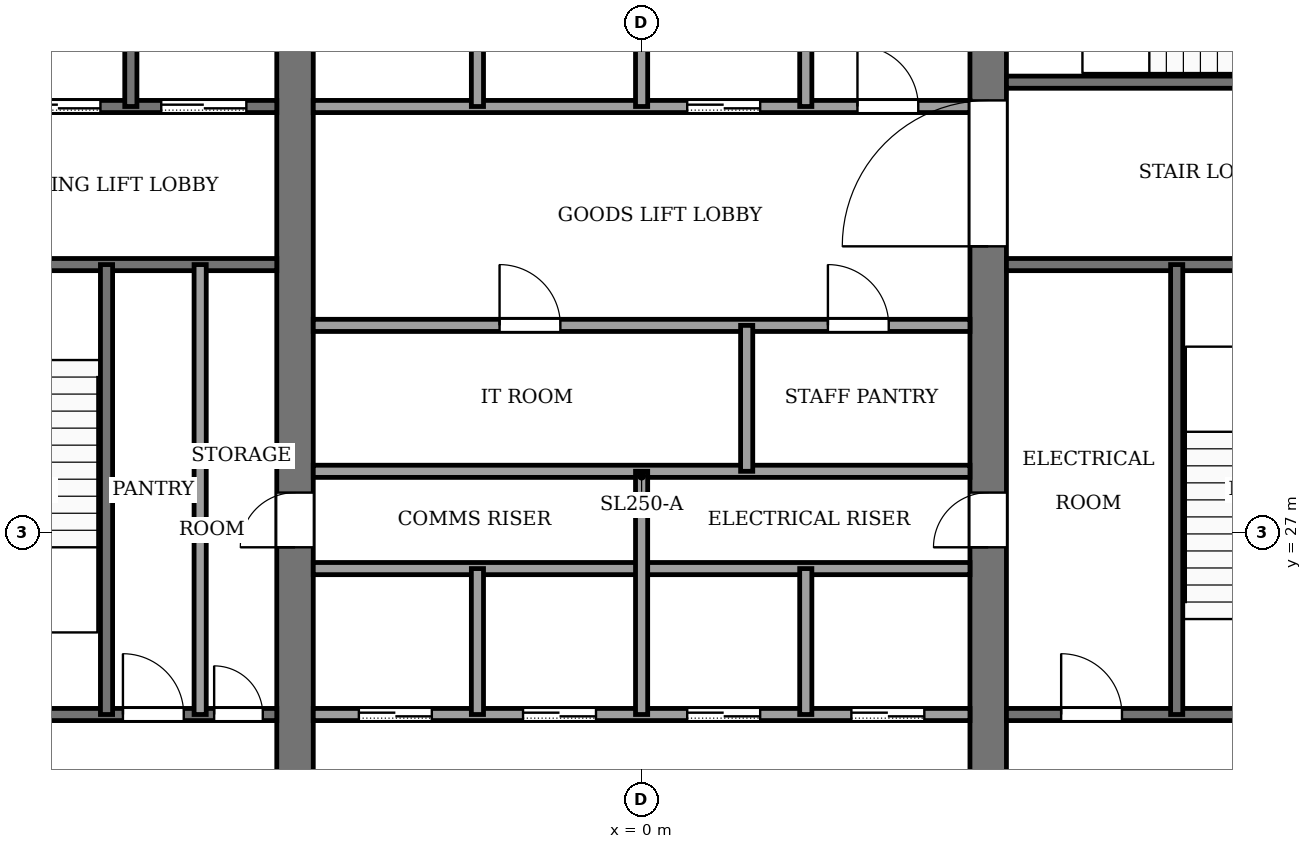
"""IFC4 building model, lengths in metres.
Left out: names, types, materials, properties, quantities, classifications, styles, units other than length and angle.
Written with IfcOpenShell. Run it as: python <this file> out.ifc"""

import sys

from ifc_helpers import new_model, si_unit, direction, frame, frame_2d, origin, place, context, subcontext, project, spatial, rectangle, extrude, element, fill, save


model = new_model("IFC4")
c1 = context("Model", 3, precision=1e-05, world=origin(), true_north=direction((0.0, 1.0)))
c2 = subcontext(c1, "Body", "Model", "MODEL_VIEW")
j1 = project(units=[si_unit("LENGTHUNIT", "METRE"), si_unit("PLANEANGLEUNIT", "RADIAN")], contexts=[c1])
p1 = place(None, origin())
s1 = spatial("IfcSite", under=j1, at=p1, CompositionType="ELEMENT")
p2 = place(p1, origin())
s2 = spatial("IfcBuilding", under=s1, at=p2, CompositionType="ELEMENT")
p3 = place(p2, frame((0.0, 0.0, 190.0)))
s3 = spatial("IfcBuildingStorey", under=s2, at=p3, CompositionType="ELEMENT", Elevation=190.0)
p4 = place(p3, frame((-5.7, 18.4, -0.13), z_axis=(0.0, 0.0, 1.0), x_axis=(0.0, 1.0, 0.0)))
e1 = element("IfcWall", 1, at=p4, inside=s3, PredefinedType="SHEAR", context=c2, shape_type="SweptSolid", body=[
    extrude(rectangle(XDim=19.2, YDim=0.6, at=frame_2d((9.6, 0.0))), origin(), (0.0, 0.0, 1.0), 4.0),
])
p5 = place(p4, frame((8.35, 0.0, 0.13)))
e2 = element("IfcOpeningElement", 2, at=p5, cuts=e1, PredefinedType="OPENING", context=c2, shape_type="SweptSolid", body=[
    extrude(rectangle(XDim=0.9, YDim=2.1, at=frame_2d((0.45, 1.05))), frame((0.0, 0.31, 0.0), z_axis=(0.0, -1.0, 0.0), x_axis=(1.0, 0.0, 0.0)), (0.0, 0.0, 1.0), 0.62),
])
p6 = place(p3, frame((5.7, 18.4, -0.13), z_axis=(0.0, 0.0, 1.0), x_axis=(0.0, 1.0, 0.0)))
e3 = element("IfcWall", 3, at=p6, inside=s3, PredefinedType="SHEAR", context=c2, shape_type="SweptSolid", body=[
    extrude(rectangle(XDim=19.2, YDim=0.6, at=frame_2d((9.6, 0.0))), origin(), (0.0, 0.0, 1.0), 4.0),
])
p7 = place(p6, frame((8.35, 0.0, 0.13)))
e4 = element("IfcOpeningElement", 4, at=p7, cuts=e3, PredefinedType="OPENING", context=c2, shape_type="SweptSolid", body=[
    extrude(rectangle(XDim=0.9, YDim=2.1, at=frame_2d((0.45, 1.05))), frame((0.0, 0.31, 0.0), z_axis=(0.0, -1.0, 0.0), x_axis=(1.0, 0.0, 0.0)), (0.0, 0.0, 1.0), 0.62),
])
p8 = place(p6, frame((13.3, 0.0, 0.13)))
e5 = element("IfcOpeningElement", 5, at=p8, cuts=e3, PredefinedType="OPENING", context=c2, shape_type="SweptSolid", body=[
    extrude(rectangle(XDim=2.4, YDim=2.4, at=frame_2d((1.2, 1.2))), frame((0.0, 0.31, 0.0), z_axis=(0.0, -1.0, 0.0), x_axis=(1.0, 0.0, 0.0)), (0.0, 0.0, 1.0), 0.62),
])
p9 = place(p3, frame((-12.6, 24.0, 0.0), z_axis=(0.0, 0.0, 1.0), x_axis=(1.0, 0.0, 0.0)))
e6 = element("IfcWall", 6, at=p9, inside=s3, PredefinedType="PARTITIONING", context=c2, shape_type="SweptSolid", body=[
    extrude(rectangle(XDim=6.6, YDim=0.2, at=frame_2d((3.3, 0.0))), origin(), (0.0, 0.0, 1.0), 3.87),
])
p10 = place(p9, frame((4.07, 0.0, 0.0)))
e7 = element("IfcOpeningElement", 7, at=p10, cuts=e6, PredefinedType="OPENING", context=c2, shape_type="SweptSolid", body=[
    extrude(rectangle(XDim=1.0, YDim=2.1, at=frame_2d((0.5, 1.05))), frame((0.0, 0.11, 0.0), z_axis=(0.0, -1.0, 0.0), x_axis=(1.0, 0.0, 0.0)), (0.0, 0.0, 1.0), 0.22),
])
p11 = place(p9, frame((5.57, 0.0, 0.0)))
e8 = element("IfcOpeningElement", 8, at=p11, cuts=e6, PredefinedType="OPENING", context=c2, shape_type="SweptSolid", body=[
    extrude(rectangle(XDim=0.8, YDim=2.1, at=frame_2d((0.4, 1.05))), frame((0.0, 0.11, 0.0), z_axis=(0.0, -1.0, 0.0), x_axis=(1.0, 0.0, 0.0)), (0.0, 0.0, 1.0), 0.22),
])
p12 = place(p3, frame((-5.4, 24.0, 0.0), z_axis=(0.0, 0.0, 1.0), x_axis=(1.0, 0.0, 0.0)))
e9 = element("IfcWall", 9, at=p12, inside=s3, PredefinedType="PARTITIONING", context=c2, shape_type="SweptSolid", body=[
    extrude(rectangle(XDim=10.8, YDim=0.2, at=frame_2d((5.4, 0.0))), origin(), (0.0, 0.0, 1.0), 3.87),
])
p13 = place(p12, frame((0.75, 0.0, 0.0)))
e10 = element("IfcOpeningElement", 10, at=p13, cuts=e9, PredefinedType="OPENING", context=c2, shape_type="SweptSolid", body=[
    extrude(rectangle(XDim=1.2, YDim=2.2, at=frame_2d((0.6, 1.1))), frame((0.0, 0.11, 0.0), z_axis=(0.0, -1.0, 0.0), x_axis=(1.0, 0.0, 0.0)), (0.0, 0.0, 1.0), 0.22),
])
p14 = place(p12, frame((3.45, 0.0, 0.0)))
e11 = element("IfcOpeningElement", 11, at=p14, cuts=e9, PredefinedType="OPENING", context=c2, shape_type="SweptSolid", body=[
    extrude(rectangle(XDim=1.2, YDim=2.2, at=frame_2d((0.6, 1.1))), frame((0.0, 0.11, 0.0), z_axis=(0.0, -1.0, 0.0), x_axis=(1.0, 0.0, 0.0)), (0.0, 0.0, 1.0), 0.22),
])
p15 = place(p12, frame((6.15, 0.0, 0.0)))
e12 = element("IfcOpeningElement", 12, at=p15, cuts=e9, PredefinedType="OPENING", context=c2, shape_type="SweptSolid", body=[
    extrude(rectangle(XDim=1.2, YDim=2.2, at=frame_2d((0.6, 1.1))), frame((0.0, 0.11, 0.0), z_axis=(0.0, -1.0, 0.0), x_axis=(1.0, 0.0, 0.0)), (0.0, 0.0, 1.0), 0.22),
])
p16 = place(p12, frame((8.85, 0.0, 0.0)))
e13 = element("IfcOpeningElement", 13, at=p16, cuts=e9, PredefinedType="OPENING", context=c2, shape_type="SweptSolid", body=[
    extrude(rectangle(XDim=1.2, YDim=2.2, at=frame_2d((0.6, 1.1))), frame((0.0, 0.11, 0.0), z_axis=(0.0, -1.0, 0.0), x_axis=(1.0, 0.0, 0.0)), (0.0, 0.0, 1.0), 0.22),
])
p17 = place(p3, frame((6.0, 24.0, 0.0), z_axis=(0.0, 0.0, 1.0), x_axis=(1.0, 0.0, 0.0)))
e14 = element("IfcWall", 14, at=p17, inside=s3, PredefinedType="PARTITIONING", context=c2, shape_type="SweptSolid", body=[
    extrude(rectangle(XDim=6.6, YDim=0.2, at=frame_2d((3.3, 0.0))), origin(), (0.0, 0.0, 1.0), 3.87),
])
p18 = place(p17, frame((0.9, 0.0, 0.0)))
e15 = element("IfcOpeningElement", 15, at=p18, cuts=e14, PredefinedType="OPENING", context=c2, shape_type="SweptSolid", body=[
    extrude(rectangle(XDim=1.0, YDim=2.1, at=frame_2d((0.5, 1.05))), frame((0.0, 0.11, 0.0), z_axis=(0.0, -1.0, 0.0), x_axis=(1.0, 0.0, 0.0)), (0.0, 0.0, 1.0), 0.22),
])
p19 = place(p17, frame((4.4, 0.0, 0.0)))
e16 = element("IfcOpeningElement", 16, at=p19, cuts=e14, PredefinedType="OPENING", context=c2, shape_type="SweptSolid", body=[
    extrude(rectangle(XDim=1.2, YDim=2.2, at=frame_2d((0.6, 1.1))), frame((0.0, 0.11, 0.0), z_axis=(0.0, -1.0, 0.0), x_axis=(1.0, 0.0, 0.0)), (0.0, 0.0, 1.0), 0.22),
])
for number, where, z_axis, x_axis in (
    (17, (-5.4, 26.4, 0.0), (0.0, 0.0, 1.0), (1.0, 0.0, 0.0)),
    (18, (-5.4, 28.0, 0.0), (0.0, 0.0, 1.0), (1.0, 0.0, 0.0)),
):
    element("IfcWall", number, at=place(p3, frame(where, z_axis=z_axis, x_axis=x_axis)), inside=s3, PredefinedType="PARTITIONING", context=c2, shape_type="SweptSolid", body=[
        extrude(rectangle(XDim=10.8, YDim=0.2, at=frame_2d((5.4, 0.0))), origin(), (0.0, 0.0, 1.0), 3.87),
    ])
p20 = place(p3, frame((-5.4, 30.4, 0.0), z_axis=(0.0, 0.0, 1.0), x_axis=(1.0, 0.0, 0.0)))
e19 = element("IfcWall", 19, at=p20, inside=s3, PredefinedType="PARTITIONING", context=c2, shape_type="SweptSolid", body=[
    extrude(rectangle(XDim=10.8, YDim=0.2, at=frame_2d((5.4, 0.0))), origin(), (0.0, 0.0, 1.0), 3.87),
])
p21 = place(p20, frame((3.064, 0.0, 0.0)))
e20 = element("IfcOpeningElement", 20, at=p21, cuts=e19, PredefinedType="OPENING", context=c2, shape_type="SweptSolid", body=[
    extrude(rectangle(XDim=1.0, YDim=2.1, at=frame_2d((0.5, 1.05))), frame((0.0, 0.11, 0.0), z_axis=(0.0, -1.0, 0.0), x_axis=(1.0, 0.0, 0.0)), (0.0, 0.0, 1.0), 0.22),
])
p22 = place(p20, frame((8.464, 0.0, 0.0)))
e21 = element("IfcOpeningElement", 21, at=p22, cuts=e19, PredefinedType="OPENING", context=c2, shape_type="SweptSolid", body=[
    extrude(rectangle(XDim=1.0, YDim=2.1, at=frame_2d((0.5, 1.05))), frame((0.0, 0.11, 0.0), z_axis=(0.0, -1.0, 0.0), x_axis=(1.0, 0.0, 0.0)), (0.0, 0.0, 1.0), 0.22),
])
p23 = place(p3, frame((-12.6, 31.4, 0.0), z_axis=(0.0, 0.0, 1.0), x_axis=(1.0, 0.0, 0.0)))
e22 = element("IfcWall", 22, at=p23, inside=s3, PredefinedType="PARTITIONING", context=c2, shape_type="SweptSolid", body=[
    extrude(rectangle(XDim=6.6, YDim=0.2, at=frame_2d((3.3, 0.0))), origin(), (0.0, 0.0, 1.0), 3.87),
])
p24 = place(p23, frame((1.0, 0.0, 0.0)))
e23 = element("IfcOpeningElement", 23, at=p24, cuts=e22, PredefinedType="OPENING", context=c2, shape_type="SweptSolid", body=[
    extrude(rectangle(XDim=1.2, YDim=2.2, at=frame_2d((0.6, 1.1))), frame((0.0, 0.11, 0.0), z_axis=(0.0, -1.0, 0.0), x_axis=(1.0, 0.0, 0.0)), (0.0, 0.0, 1.0), 0.22),
])
p25 = place(p3, frame((6.0, 31.4, 0.0), z_axis=(0.0, 0.0, 1.0), x_axis=(1.0, 0.0, 0.0)))
e24 = element("IfcWall", 24, at=p25, inside=s3, PredefinedType="PARTITIONING", context=c2, shape_type="SweptSolid", body=[
    extrude(rectangle(XDim=6.6, YDim=0.2, at=frame_2d((3.3, 0.0))), origin(), (0.0, 0.0, 1.0), 3.87),
])
p26 = place(p3, frame((-12.6, 34.0, 0.0), z_axis=(0.0, 0.0, 1.0), x_axis=(1.0, 0.0, 0.0)))
e25 = element("IfcWall", 25, at=p26, inside=s3, PredefinedType="PARTITIONING", context=c2, shape_type="SweptSolid", body=[
    extrude(rectangle(XDim=6.6, YDim=0.2, at=frame_2d((3.3, 0.0))), origin(), (0.0, 0.0, 1.0), 3.87),
])
p27 = place(p26, frame((4.7, 0.0, 0.0)))
e26 = element("IfcOpeningElement", 26, at=p27, cuts=e25, PredefinedType="OPENING", context=c2, shape_type="SweptSolid", body=[
    extrude(rectangle(XDim=1.4, YDim=2.2, at=frame_2d((0.7, 1.1))), frame((0.0, 0.11, 0.0), z_axis=(0.0, -1.0, 0.0), x_axis=(1.0, 0.0, 0.0)), (0.0, 0.0, 1.0), 0.22),
])
p28 = place(p26, frame((2.3, 0.0, 0.0)))
e27 = element("IfcOpeningElement", 27, at=p28, cuts=e25, PredefinedType="OPENING", context=c2, shape_type="SweptSolid", body=[
    extrude(rectangle(XDim=1.4, YDim=2.2, at=frame_2d((0.7, 1.1))), frame((0.0, 0.11, 0.0), z_axis=(0.0, -1.0, 0.0), x_axis=(1.0, 0.0, 0.0)), (0.0, 0.0, 1.0), 0.22),
])
p29 = place(p26, frame((0.45, 0.0, 0.0)))
e28 = element("IfcOpeningElement", 28, at=p29, cuts=e25, PredefinedType="OPENING", context=c2, shape_type="SweptSolid", body=[
    extrude(rectangle(XDim=0.9, YDim=2.1, at=frame_2d((0.45, 1.05))), frame((0.0, 0.11, 0.0), z_axis=(0.0, -1.0, 0.0), x_axis=(1.0, 0.0, 0.0)), (0.0, 0.0, 1.0), 0.22),
])
p30 = place(p3, frame((-5.4, 34.0, 0.0), z_axis=(0.0, 0.0, 1.0), x_axis=(1.0, 0.0, 0.0)))
e29 = element("IfcWall", 29, at=p30, inside=s3, PredefinedType="PARTITIONING", context=c2, shape_type="SweptSolid", body=[
    extrude(rectangle(XDim=10.8, YDim=0.2, at=frame_2d((5.4, 0.0))), origin(), (0.0, 0.0, 1.0), 3.87),
])
p31 = place(p30, frame((6.15, 0.0, 0.0)))
e30 = element("IfcOpeningElement", 30, at=p31, cuts=e29, PredefinedType="OPENING", context=c2, shape_type="SweptSolid", body=[
    extrude(rectangle(XDim=1.2, YDim=2.2, at=frame_2d((0.6, 1.1))), frame((0.0, 0.11, 0.0), z_axis=(0.0, -1.0, 0.0), x_axis=(1.0, 0.0, 0.0)), (0.0, 0.0, 1.0), 0.22),
])
p32 = place(p30, frame((8.95, 0.0, 0.0)))
e31 = element("IfcOpeningElement", 31, at=p32, cuts=e29, PredefinedType="OPENING", context=c2, shape_type="SweptSolid", body=[
    extrude(rectangle(XDim=1.0, YDim=2.1, at=frame_2d((0.5, 1.05))), frame((0.0, 0.11, 0.0), z_axis=(0.0, -1.0, 0.0), x_axis=(1.0, 0.0, 0.0)), (0.0, 0.0, 1.0), 0.22),
])
p33 = place(p3, frame((6.0, 34.4, 0.0), z_axis=(0.0, 0.0, 1.0), x_axis=(1.0, 0.0, 0.0)))
e32 = element("IfcWall", 32, at=p33, inside=s3, PredefinedType="PARTITIONING", context=c2, shape_type="SweptSolid", body=[
    extrude(rectangle(XDim=6.6, YDim=0.2, at=frame_2d((3.3, 0.0))), origin(), (0.0, 0.0, 1.0), 3.87),
])
p34 = place(p33, frame((4.8, 0.0, 0.0)))
e33 = element("IfcOpeningElement", 33, at=p34, cuts=e32, PredefinedType="OPENING", context=c2, shape_type="SweptSolid", body=[
    extrude(rectangle(XDim=1.2, YDim=2.2, at=frame_2d((0.6, 1.1))), frame((0.0, 0.11, 0.0), z_axis=(0.0, -1.0, 0.0), x_axis=(1.0, 0.0, 0.0)), (0.0, 0.0, 1.0), 0.22),
])
p35 = place(p3, frame((-8.8, 24.0, 0.0), z_axis=(0.0, 0.0, 1.0), x_axis=(0.0, 1.0, 0.0)))
e34 = element("IfcWall", 34, at=p35, inside=s3, PredefinedType="PARTITIONING", context=c2, shape_type="SweptSolid", body=[
    extrude(rectangle(XDim=7.4, YDim=0.2, at=frame_2d((3.7, 0.0))), origin(), (0.0, 0.0, 1.0), 3.87),
])
p36 = place(p3, frame((-8.4, 34.0, 0.0), z_axis=(0.0, 0.0, 1.0), x_axis=(0.0, 1.0, 0.0)))
e35 = element("IfcWall", 35, at=p36, inside=s3, PredefinedType="PARTITIONING", context=c2, shape_type="SweptSolid", body=[
    extrude(rectangle(XDim=3.6, YDim=0.2, at=frame_2d((1.8, 0.0))), origin(), (0.0, 0.0, 1.0), 3.87),
])
p37 = place(p3, frame((-7.26, 24.0, 0.0), z_axis=(0.0, 0.0, 1.0), x_axis=(0.0, 1.0, 0.0)))
e36 = element("IfcWall", 36, at=p37, inside=s3, PredefinedType="PARTITIONING", context=c2, shape_type="SweptSolid", body=[
    extrude(rectangle(XDim=7.4, YDim=0.2, at=frame_2d((3.7, 0.0))), origin(), (0.0, 0.0, 1.0), 3.87),
])
p38 = place(p3, frame((-2.7, 24.0, 0.0), z_axis=(0.0, 0.0, 1.0), x_axis=(0.0, 1.0, 0.0)))
e37 = element("IfcWall", 37, at=p38, inside=s3, PredefinedType="PARTITIONING", context=c2, shape_type="SweptSolid", body=[
    extrude(rectangle(XDim=2.4, YDim=0.2, at=frame_2d((1.2, 0.0))), origin(), (0.0, 0.0, 1.0), 3.87),
])
p39 = place(p3, frame((-2.7, 34.0, 0.0), z_axis=(0.0, 0.0, 1.0), x_axis=(0.0, 1.0, 0.0)))
e38 = element("IfcWall", 38, at=p39, inside=s3, PredefinedType="PARTITIONING", context=c2, shape_type="SweptSolid", body=[
    extrude(rectangle(XDim=3.6, YDim=0.2, at=frame_2d((1.8, 0.0))), origin(), (0.0, 0.0, 1.0), 3.87),
])
p40 = place(p3, frame((0.0, 24.0, 0.0), z_axis=(0.0, 0.0, 1.0), x_axis=(0.0, 1.0, 0.0)))
e39 = element("IfcWall", 39, at=p40, inside=s3, PredefinedType="PARTITIONING", context=c2, shape_type="SweptSolid", body=[
    extrude(rectangle(XDim=4.0, YDim=0.2, at=frame_2d((2.0, 0.0))), origin(), (0.0, 0.0, 1.0), 3.87),
])
p41 = place(p3, frame((0.0, 34.0, 0.0), z_axis=(0.0, 0.0, 1.0), x_axis=(0.0, 1.0, 0.0)))
e40 = element("IfcWall", 40, at=p41, inside=s3, PredefinedType="PARTITIONING", context=c2, shape_type="SweptSolid", body=[
    extrude(rectangle(XDim=3.6, YDim=0.2, at=frame_2d((1.8, 0.0))), origin(), (0.0, 0.0, 1.0), 3.87),
])
for number, where, z_axis, x_axis in (
    (41, (1.728, 28.0, 0.0), (0.0, 0.0, 1.0), (0.0, 1.0, 0.0)),
    (42, (2.7, 24.0, 0.0), (0.0, 0.0, 1.0), (0.0, 1.0, 0.0)),
):
    element("IfcWall", number, at=place(p3, frame(where, z_axis=z_axis, x_axis=x_axis)), inside=s3, PredefinedType="PARTITIONING", context=c2, shape_type="SweptSolid", body=[
        extrude(rectangle(XDim=2.4, YDim=0.2, at=frame_2d((1.2, 0.0))), origin(), (0.0, 0.0, 1.0), 3.87),
    ])
p42 = place(p3, frame((2.7, 34.0, 0.0), z_axis=(0.0, 0.0, 1.0), x_axis=(0.0, 1.0, 0.0)))
e43 = element("IfcWall", 43, at=p42, inside=s3, PredefinedType="PARTITIONING", context=c2, shape_type="SweptSolid", body=[
    extrude(rectangle(XDim=3.6, YDim=0.2, at=frame_2d((1.8, 0.0))), origin(), (0.0, 0.0, 1.0), 3.87),
])
p43 = place(p3, frame((8.8, 24.0, 0.0), z_axis=(0.0, 0.0, 1.0), x_axis=(0.0, 1.0, 0.0)))
e44 = element("IfcWall", 44, at=p43, inside=s3, PredefinedType="PARTITIONING", context=c2, shape_type="SweptSolid", body=[
    extrude(rectangle(XDim=7.4, YDim=0.2, at=frame_2d((3.7, 0.0))), origin(), (0.0, 0.0, 1.0), 3.87),
])
p44 = place(p13, origin())
e45 = element("IfcDoor", 45, at=p44, inside=s3, OperationType="SLIDING_TO_LEFT", PredefinedType="DOOR", context=c2, shape_type="SweptSolid", body=[
    extrude(rectangle(XDim=1.2, YDim=2.2, at=frame_2d((0.6, 1.1))), frame((0.0, 0.025, 0.0), z_axis=(0.0, -1.0, 0.0), x_axis=(1.0, 0.0, 0.0)), (0.0, 0.0, 1.0), 0.05),
])
fill(e10, e45)
p45 = place(p14, origin())
e46 = element("IfcDoor", 46, at=p45, inside=s3, OperationType="SLIDING_TO_LEFT", PredefinedType="DOOR", context=c2, shape_type="SweptSolid", body=[
    extrude(rectangle(XDim=1.2, YDim=2.2, at=frame_2d((0.6, 1.1))), frame((0.0, 0.025, 0.0), z_axis=(0.0, -1.0, 0.0), x_axis=(1.0, 0.0, 0.0)), (0.0, 0.0, 1.0), 0.05),
])
fill(e11, e46)
p46 = place(p15, origin())
e47 = element("IfcDoor", 47, at=p46, inside=s3, OperationType="SLIDING_TO_LEFT", PredefinedType="DOOR", context=c2, shape_type="SweptSolid", body=[
    extrude(rectangle(XDim=1.2, YDim=2.2, at=frame_2d((0.6, 1.1))), frame((0.0, 0.025, 0.0), z_axis=(0.0, -1.0, 0.0), x_axis=(1.0, 0.0, 0.0)), (0.0, 0.0, 1.0), 0.05),
])
fill(e12, e47)
p47 = place(p16, origin())
e48 = element("IfcDoor", 48, at=p47, inside=s3, OperationType="SLIDING_TO_LEFT", PredefinedType="DOOR", context=c2, shape_type="SweptSolid", body=[
    extrude(rectangle(XDim=1.2, YDim=2.2, at=frame_2d((0.6, 1.1))), frame((0.0, 0.025, 0.0), z_axis=(0.0, -1.0, 0.0), x_axis=(1.0, 0.0, 0.0)), (0.0, 0.0, 1.0), 0.05),
])
fill(e13, e48)
p48 = place(p31, origin())
e49 = element("IfcDoor", 49, at=p48, inside=s3, OperationType="SLIDING_TO_LEFT", PredefinedType="DOOR", context=c2, shape_type="SweptSolid", body=[
    extrude(rectangle(XDim=1.2, YDim=2.2, at=frame_2d((0.6, 1.1))), frame((0.0, 0.025, 0.0), z_axis=(0.0, -1.0, 0.0), x_axis=(1.0, 0.0, 0.0)), (0.0, 0.0, 1.0), 0.05),
])
fill(e30, e49)
p49 = place(p27, origin())
e50 = element("IfcDoor", 50, at=p49, inside=s3, OperationType="SLIDING_TO_LEFT", PredefinedType="DOOR", context=c2, shape_type="SweptSolid", body=[
    extrude(rectangle(XDim=1.4, YDim=2.2, at=frame_2d((0.7, 1.1))), frame((0.0, 0.025, 0.0), z_axis=(0.0, -1.0, 0.0), x_axis=(1.0, 0.0, 0.0)), (0.0, 0.0, 1.0), 0.05),
])
fill(e26, e50)
p50 = place(p28, origin())
e51 = element("IfcDoor", 51, at=p50, inside=s3, OperationType="SLIDING_TO_LEFT", PredefinedType="DOOR", context=c2, shape_type="SweptSolid", body=[
    extrude(rectangle(XDim=1.4, YDim=2.2, at=frame_2d((0.7, 1.1))), frame((0.0, 0.025, 0.0), z_axis=(0.0, -1.0, 0.0), x_axis=(1.0, 0.0, 0.0)), (0.0, 0.0, 1.0), 0.05),
])
fill(e27, e51)
p51 = place(p21, origin())
e52 = element("IfcDoor", 52, at=p51, inside=s3, OperationType="SINGLE_SWING_RIGHT", PredefinedType="DOOR", context=c2, shape_type="SweptSolid", body=[
    extrude(rectangle(XDim=1.0, YDim=2.1, at=frame_2d((0.5, 1.05))), frame((0.0, 0.025, 0.0), z_axis=(0.0, -1.0, 0.0), x_axis=(1.0, 0.0, 0.0)), (0.0, 0.0, 1.0), 0.05),
])
fill(e20, e52)
p52 = place(p22, origin())
e53 = element("IfcDoor", 53, at=p52, inside=s3, OperationType="SINGLE_SWING_LEFT", PredefinedType="DOOR", context=c2, shape_type="SweptSolid", body=[
    extrude(rectangle(XDim=1.0, YDim=2.1, at=frame_2d((0.5, 1.05))), frame((0.0, 0.025, 0.0), z_axis=(0.0, -1.0, 0.0), x_axis=(1.0, 0.0, 0.0)), (0.0, 0.0, 1.0), 0.05),
])
fill(e21, e53)
p53 = place(p10, origin())
e54 = element("IfcDoor", 54, at=p53, inside=s3, OperationType="SINGLE_SWING_RIGHT", PredefinedType="DOOR", context=c2, shape_type="SweptSolid", body=[
    extrude(rectangle(XDim=1.0, YDim=2.1, at=frame_2d((0.5, 1.05))), frame((0.0, 0.025, 0.0), z_axis=(0.0, -1.0, 0.0), x_axis=(1.0, 0.0, 0.0)), (0.0, 0.0, 1.0), 0.05),
])
fill(e7, e54)
p54 = place(p11, origin())
e55 = element("IfcDoor", 55, at=p54, inside=s3, OperationType="SINGLE_SWING_LEFT", PredefinedType="DOOR", context=c2, shape_type="SweptSolid", body=[
    extrude(rectangle(XDim=0.8, YDim=2.1, at=frame_2d((0.4, 1.05))), frame((0.0, 0.025, 0.0), z_axis=(0.0, -1.0, 0.0), x_axis=(1.0, 0.0, 0.0)), (0.0, 0.0, 1.0), 0.05),
])
fill(e8, e55)
p55 = place(p18, origin())
e56 = element("IfcDoor", 56, at=p55, inside=s3, OperationType="SINGLE_SWING_RIGHT", PredefinedType="DOOR", context=c2, shape_type="SweptSolid", body=[
    extrude(rectangle(XDim=1.0, YDim=2.1, at=frame_2d((0.5, 1.05))), frame((0.0, 0.025, 0.0), z_axis=(0.0, -1.0, 0.0), x_axis=(1.0, 0.0, 0.0)), (0.0, 0.0, 1.0), 0.05),
])
fill(e15, e56)
p56 = place(p32, origin())
e57 = element("IfcDoor", 57, at=p56, inside=s3, OperationType="SINGLE_SWING_LEFT", PredefinedType="DOOR", context=c2, shape_type="SweptSolid", body=[
    extrude(rectangle(XDim=1.0, YDim=2.1, at=frame_2d((0.5, 1.05))), frame((0.0, 0.025, 0.0), z_axis=(0.0, -1.0, 0.0), x_axis=(1.0, 0.0, 0.0)), (0.0, 0.0, 1.0), 0.05),
])
fill(e31, e57)
p57 = place(p5, origin())
e58 = element("IfcDoor", 58, at=p57, inside=s3, OperationType="SINGLE_SWING_LEFT", PredefinedType="DOOR", context=c2, shape_type="SweptSolid", body=[
    extrude(rectangle(XDim=0.9, YDim=2.1, at=frame_2d((0.45, 1.05))), frame((0.0, 0.025, 0.0), z_axis=(0.0, -1.0, 0.0), x_axis=(1.0, 0.0, 0.0)), (0.0, 0.0, 1.0), 0.05),
])
fill(e2, e58)
p58 = place(p7, origin())
e59 = element("IfcDoor", 59, at=p58, inside=s3, OperationType="SINGLE_SWING_RIGHT", PredefinedType="DOOR", context=c2, shape_type="SweptSolid", body=[
    extrude(rectangle(XDim=0.9, YDim=2.1, at=frame_2d((0.45, 1.05))), frame((0.0, 0.025, 0.0), z_axis=(0.0, -1.0, 0.0), x_axis=(1.0, 0.0, 0.0)), (0.0, 0.0, 1.0), 0.05),
])
fill(e4, e59)
p59 = place(p8, origin())
e60 = element("IfcDoor", 60, at=p59, inside=s3, OperationType="DOUBLE_DOOR_SINGLE_SWING", PredefinedType="DOOR", context=c2, shape_type="SweptSolid", body=[
    extrude(rectangle(XDim=2.4, YDim=2.4, at=frame_2d((1.2, 1.2))), frame((0.0, 0.025, 0.0), z_axis=(0.0, -1.0, 0.0), x_axis=(1.0, 0.0, 0.0)), (0.0, 0.0, 1.0), 0.05),
])
fill(e5, e60)
save(model, sys.argv[1])
